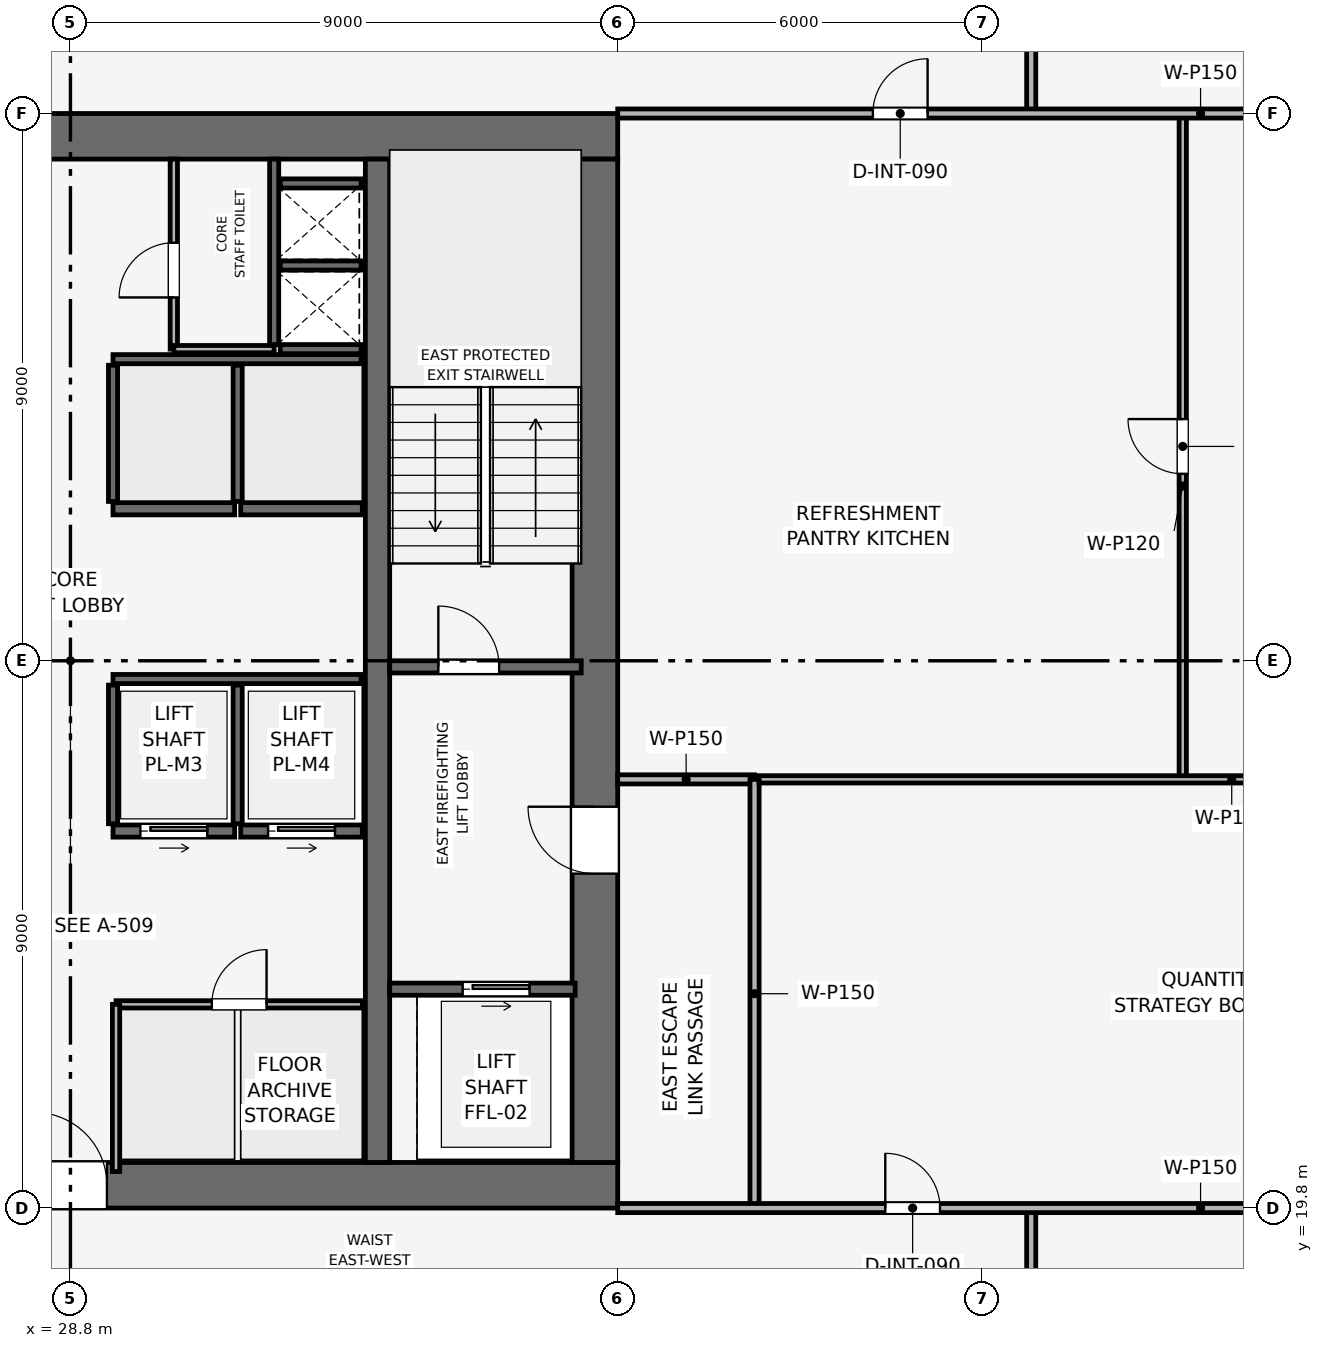
"""IFC4 building model, lengths in metres.
Left out: names, types, materials, properties, quantities, classifications, styles, units other than length and angle.
Written with IfcOpenShell. Run it as: python <this file> out.ifc"""

import sys

from ifc_helpers import new_model, si_unit, direction, frame, frame_2d, origin, place, context, subcontext, project, spatial, rectangle, extrude, element, fill, save


model = new_model("IFC4")
c1 = context("Model", 3, precision=1e-05, world=origin(), true_north=direction((0.0, 1.0)))
c2 = subcontext(c1, "Body", "Model", "MODEL_VIEW")
j1 = project(units=[si_unit("LENGTHUNIT", "METRE"), si_unit("PLANEANGLEUNIT", "RADIAN")], contexts=[c1])
p1 = place(None, origin())
s1 = spatial("IfcSite", under=j1, at=p1, CompositionType="ELEMENT")
p2 = place(p1, origin())
s2 = spatial("IfcBuilding", under=s1, at=p2, CompositionType="ELEMENT")
p3 = place(p2, frame((0.0, 0.0, 218.7)))
s3 = spatial("IfcBuildingStorey", under=s2, at=p3, CompositionType="ELEMENT", Elevation=218.7)
p4 = place(p3, frame((19.8, 20.175, 0.0), z_axis=(0.0, 0.0, 1.0), x_axis=(1.0, 0.0, 0.0)))
e1 = element("IfcWall", 1, at=p4, inside=s3, PredefinedType="SHEAR", context=c2, shape_type="SweptSolid", body=[
    extrude(rectangle(XDim=18.0, YDim=0.75, at=frame_2d((9.0, 0.0))), origin(), (0.0, 0.0, 1.0), 3.75),
])
p5 = place(p4, frame((8.4, 0.0, 0.0)))
e2 = element("IfcOpeningElement", 2, at=p5, cuts=e1, PredefinedType="OPENING", context=c2, shape_type="SweptSolid", body=[
    extrude(rectangle(XDim=1.2, YDim=2.2, at=frame_2d((0.6, 1.1))), frame((0.0, 0.385, 0.0), z_axis=(0.0, -1.0, 0.0), x_axis=(1.0, 0.0, 0.0)), (0.0, 0.0, 1.0), 0.77),
])
p6 = place(p3, frame((19.8, 37.425, 0.0), z_axis=(0.0, 0.0, 1.0), x_axis=(1.0, 0.0, 0.0)))
e3 = element("IfcWall", 3, at=p6, inside=s3, PredefinedType="SHEAR", context=c2, shape_type="SweptSolid", body=[
    extrude(rectangle(XDim=18.0, YDim=0.75, at=frame_2d((9.0, 0.0))), origin(), (0.0, 0.0, 1.0), 3.75),
])
p7 = place(p6, frame((7.05, 0.0, 0.0)))
e4 = element("IfcOpeningElement", 4, at=p7, cuts=e3, PredefinedType="OPENING", context=c2, shape_type="SweptSolid", body=[
    extrude(rectangle(XDim=1.1, YDim=2.15, at=frame_2d((0.55, 1.075))), frame((0.0, 0.385, 0.0), z_axis=(0.0, -1.0, 0.0), x_axis=(1.0, 0.0, 0.0)), (0.0, 0.0, 1.0), 0.77),
])
p8 = place(p3, frame((37.425, 20.55, 0.0), z_axis=(0.0, 0.0, 1.0), x_axis=(0.0, 1.0, 0.0)))
e5 = element("IfcWall", 5, at=p8, inside=s3, PredefinedType="SHEAR", context=c2, shape_type="SweptSolid", body=[
    extrude(rectangle(XDim=16.5, YDim=0.75, at=frame_2d((8.25, 0.0))), origin(), (0.0, 0.0, 1.0), 3.75),
])
p9 = place(p8, frame((4.75, 0.0, 0.0)))
e6 = element("IfcOpeningElement", 6, at=p9, cuts=e5, PredefinedType="OPENING", context=c2, shape_type="SweptSolid", body=[
    extrude(rectangle(XDim=1.1, YDim=2.15, at=frame_2d((0.55, 1.075))), frame((0.0, 0.385, 0.0), z_axis=(0.0, -1.0, 0.0), x_axis=(1.0, 0.0, 0.0)), (0.0, 0.0, 1.0), 0.77),
])
p10 = place(p3, frame((33.85, 20.55, 0.0), z_axis=(0.0, 0.0, 1.0), x_axis=(0.0, 1.0, 0.0)))
e7 = element("IfcWall", 7, at=p10, inside=s3, PredefinedType="SHEAR", context=c2, shape_type="SweptSolid", body=[
    extrude(rectangle(XDim=16.5, YDim=0.4, at=frame_2d((8.25, 0.0))), origin(), (0.0, 0.0, 1.0), 3.75),
])
p11 = place(p3, frame((34.05, 28.7, 0.0), z_axis=(0.0, 0.0, 1.0), x_axis=(1.0, 0.0, 0.0)))
e8 = element("IfcWall", 8, at=p11, inside=s3, PredefinedType="SHEAR", context=c2, shape_type="SweptSolid", body=[
    extrude(rectangle(XDim=3.15, YDim=0.2, at=frame_2d((1.575, 0.0))), origin(), (0.0, 0.0, 1.0), 3.5),
])
p12 = place(p11, frame((0.8, 0.0, 0.0)))
e9 = element("IfcOpeningElement", 9, at=p12, cuts=e8, PredefinedType="OPENING", context=c2, shape_type="SweptSolid", body=[
    extrude(rectangle(XDim=1.0, YDim=2.1, at=frame_2d((0.5, 1.05))), frame((0.0, 0.11, 0.0), z_axis=(0.0, -1.0, 0.0), x_axis=(1.0, 0.0, 0.0)), (0.0, 0.0, 1.0), 0.22),
])
p13 = place(p3, frame((32.15, 34.0, 0.0), z_axis=(0.0, 0.0, 1.0), x_axis=(0.0, 1.0, 0.0)))
e10 = element("IfcWall", 10, at=p13, inside=s3, PredefinedType="SHEAR", context=c2, shape_type="SweptSolid", body=[
    extrude(rectangle(XDim=3.05, YDim=0.15, at=frame_2d((1.525, 0.0))), origin(), (0.0, 0.0, 1.0), 3.5),
])
for number, where, z_axis, x_axis in (
    (11, (32.25, 33.925, 0.0), (0.0, 0.0, 1.0), (1.0, 0.0, 0.0)),
    (12, (32.25, 35.3, 0.0), (0.0, 0.0, 1.0), (1.0, 0.0, 0.0)),
):
    element("IfcWall", number, at=place(p3, frame(where, z_axis=z_axis, x_axis=x_axis)), inside=s3, PredefinedType="SHEAR", context=c2, shape_type="SweptSolid", body=[
        extrude(rectangle(XDim=1.33, YDim=0.15, at=frame_2d((0.665, 0.0))), origin(), (0.0, 0.0, 1.0), 3.5),
    ])
p14 = place(p3, frame((34.05, 23.4, 0.0), z_axis=(0.0, 0.0, 1.0), x_axis=(1.0, 0.0, 0.0)))
e13 = element("IfcWall", 13, at=p14, inside=s3, PredefinedType="SHEAR", context=c2, shape_type="SweptSolid", body=[
    extrude(rectangle(XDim=3.05, YDim=0.2, at=frame_2d((1.525, 0.0))), origin(), (0.0, 0.0, 1.0), 3.5),
])
p15 = place(p14, frame((1.2, 0.0, 0.0)))
e14 = element("IfcOpeningElement", 14, at=p15, cuts=e13, PredefinedType="OPENING", context=c2, shape_type="SweptSolid", body=[
    extrude(rectangle(XDim=1.1, YDim=2.15, at=frame_2d((0.55, 1.075))), frame((0.0, 0.11, 0.0), z_axis=(0.0, -1.0, 0.0), x_axis=(1.0, 0.0, 0.0)), (0.0, 0.0, 1.0), 0.22),
])
p16 = place(p3, frame((29.5, 26.0, 0.0), z_axis=(0.0, 0.0, 1.0), x_axis=(1.0, 0.0, 0.0)))
e15 = element("IfcWall", 15, at=p16, inside=s3, PredefinedType="SHEAR", context=c2, shape_type="SweptSolid", body=[
    extrude(rectangle(XDim=2.0, YDim=0.2, at=frame_2d((1.0, 0.0))), origin(), (0.0, 0.0, 1.0), 3.5),
])
p17 = place(p16, frame((0.45, 0.0, 0.0)))
e16 = element("IfcOpeningElement", 16, at=p17, cuts=e15, PredefinedType="OPENING", context=c2, shape_type="SweptSolid", body=[
    extrude(rectangle(XDim=1.1, YDim=2.15, at=frame_2d((0.55, 1.075))), frame((0.0, 0.11, 0.0), z_axis=(0.0, -1.0, 0.0), x_axis=(1.0, 0.0, 0.0)), (0.0, 0.0, 1.0), 0.22),
])
p18 = place(p3, frame((31.6, 26.0, 0.0), z_axis=(0.0, 0.0, 1.0), x_axis=(1.0, 0.0, 0.0)))
e17 = element("IfcWall", 17, at=p18, inside=s3, PredefinedType="SHEAR", context=c2, shape_type="SweptSolid", body=[
    extrude(rectangle(XDim=2.0, YDim=0.2, at=frame_2d((1.0, 0.0))), origin(), (0.0, 0.0, 1.0), 3.5),
])
p19 = place(p18, frame((0.45, 0.0, 0.0)))
e18 = element("IfcOpeningElement", 18, at=p19, cuts=e17, PredefinedType="OPENING", context=c2, shape_type="SweptSolid", body=[
    extrude(rectangle(XDim=1.1, YDim=2.15, at=frame_2d((0.55, 1.075))), frame((0.0, 0.11, 0.0), z_axis=(0.0, -1.0, 0.0), x_axis=(1.0, 0.0, 0.0)), (0.0, 0.0, 1.0), 0.22),
])
for number, where, z_axis, x_axis in (
    (19, (29.5, 31.3, 0.0), (0.0, 0.0, 1.0), (1.0, 0.0, 0.0)),
    (20, (31.6, 31.3, 0.0), (0.0, 0.0, 1.0), (1.0, 0.0, 0.0)),
):
    element("IfcWall", number, at=place(p3, frame(where, z_axis=z_axis, x_axis=x_axis)), inside=s3, PredefinedType="SHEAR", context=c2, shape_type="SweptSolid", body=[
        extrude(rectangle(XDim=2.0, YDim=0.2, at=frame_2d((1.0, 0.0))), origin(), (0.0, 0.0, 1.0), 3.5),
    ])
p20 = place(p3, frame((32.25, 36.65, 0.0), z_axis=(0.0, 0.0, 1.0), x_axis=(1.0, 0.0, 0.0)))
e21 = element("IfcWall", 21, at=p20, inside=s3, PredefinedType="SHEAR", context=c2, shape_type="SweptSolid", body=[
    extrude(rectangle(XDim=1.33, YDim=0.15, at=frame_2d((0.665, 0.0))), origin(), (0.0, 0.0, 1.0), 3.5),
])
p21 = place(p3, frame((29.5, 28.5, 0.0), z_axis=(0.0, 0.0, 1.0), x_axis=(1.0, 0.0, 0.0)))
e22 = element("IfcWall", 22, at=p21, inside=s3, PredefinedType="SHEAR", context=c2, shape_type="SweptSolid", body=[
    extrude(rectangle(XDim=4.08, YDim=0.15, at=frame_2d((2.04, 0.0))), origin(), (0.0, 0.0, 1.0), 3.5),
])
for number, where, z_axis, x_axis in (
    (23, (29.5, 26.12, 0.0), (0.0, 0.0, 1.0), (0.0, 1.0, 0.0)),
    (24, (31.55, 26.12, 0.0), (0.0, 0.0, 1.0), (0.0, 1.0, 0.0)),
):
    element("IfcWall", number, at=place(p3, frame(where, z_axis=z_axis, x_axis=x_axis)), inside=s3, PredefinedType="SHEAR", context=c2, shape_type="SweptSolid", body=[
        extrude(rectangle(XDim=2.28, YDim=0.15, at=frame_2d((1.14, 0.0))), origin(), (0.0, 0.0, 1.0), 3.5),
    ])
p22 = place(p3, frame((29.5, 33.76, 0.0), z_axis=(0.0, 0.0, 1.0), x_axis=(1.0, 0.0, 0.0)))
e25 = element("IfcWall", 25, at=p22, inside=s3, PredefinedType="SHEAR", context=c2, shape_type="SweptSolid", body=[
    extrude(rectangle(XDim=4.08, YDim=0.15, at=frame_2d((2.04, 0.0))), origin(), (0.0, 0.0, 1.0), 3.5),
])
for number, where, z_axis, x_axis in (
    (26, (29.5, 31.42, 0.0), (0.0, 0.0, 1.0), (0.0, 1.0, 0.0)),
    (27, (31.55, 31.42, 0.0), (0.0, 0.0, 1.0), (0.0, 1.0, 0.0)),
):
    element("IfcWall", number, at=place(p3, frame(where, z_axis=z_axis, x_axis=x_axis)), inside=s3, PredefinedType="SHEAR", context=c2, shape_type="SweptSolid", body=[
        extrude(rectangle(XDim=2.24, YDim=0.15, at=frame_2d((1.12, 0.0))), origin(), (0.0, 0.0, 1.0), 3.5),
    ])
p23 = place(p3, frame((30.5, 33.925, 0.0), z_axis=(0.0, 0.0, 1.0), x_axis=(0.0, 1.0, 0.0)))
e28 = element("IfcWall", 28, at=p23, inside=s3, PredefinedType="PARTITIONING", context=c2, shape_type="SweptSolid", body=[
    extrude(rectangle(XDim=3.125, YDim=0.12, at=frame_2d((1.562, 0.0))), origin(), (0.0, 0.0, 1.0), 3.5),
])
p24 = place(p23, frame((0.85, 0.0, 0.0)))
e29 = element("IfcOpeningElement", 29, at=p24, cuts=e28, PredefinedType="OPENING", context=c2, shape_type="SweptSolid", body=[
    extrude(rectangle(XDim=0.9, YDim=2.1, at=frame_2d((0.45, 1.05))), frame((0.0, 0.07, 0.0), z_axis=(0.0, -1.0, 0.0), x_axis=(1.0, 0.0, 0.0)), (0.0, 0.0, 1.0), 0.14),
])
p25 = place(p3, frame((30.5, 33.925, 0.0), z_axis=(0.0, 0.0, 1.0), x_axis=(1.0, 0.0, 0.0)))
e30 = element("IfcWall", 30, at=p25, inside=s3, PredefinedType="PARTITIONING", context=c2, shape_type="SweptSolid", body=[
    extrude(rectangle(XDim=1.65, YDim=0.12, at=frame_2d((0.825, 0.0))), origin(), (0.0, 0.0, 1.0), 3.5),
])
p26 = place(p3, frame((29.55, 23.15, 0.0), z_axis=(0.0, 0.0, 1.0), x_axis=(1.0, 0.0, 0.0)))
e31 = element("IfcWall", 31, at=p26, inside=s3, PredefinedType="PARTITIONING", context=c2, shape_type="SweptSolid", body=[
    extrude(rectangle(XDim=4.05, YDim=0.12, at=frame_2d((2.025, 0.0))), origin(), (0.0, 0.0, 1.0), 3.5),
])
p27 = place(p26, frame((1.575, 0.0, 0.0)))
e32 = element("IfcOpeningElement", 32, at=p27, cuts=e31, PredefinedType="OPENING", context=c2, shape_type="SweptSolid", body=[
    extrude(rectangle(XDim=0.9, YDim=2.1, at=frame_2d((0.45, 1.05))), frame((0.0, 0.07, 0.0), z_axis=(0.0, -1.0, 0.0), x_axis=(1.0, 0.0, 0.0)), (0.0, 0.0, 1.0), 0.14),
])
p28 = place(p3, frame((29.55, 20.4, 0.0), z_axis=(0.0, 0.0, 1.0), x_axis=(0.0, 1.0, 0.0)))
e33 = element("IfcWall", 33, at=p28, inside=s3, PredefinedType="PARTITIONING", context=c2, shape_type="SweptSolid", body=[
    extrude(rectangle(XDim=2.75, YDim=0.12, at=frame_2d((1.375, 0.0))), origin(), (0.0, 0.0, 1.0), 3.5),
])
p29 = place(p3, frame((37.8, 26.85, 0.0), z_axis=(0.0, 0.0, 1.0), x_axis=(1.0, 0.0, 0.0)))
e34 = element("IfcWall", 34, at=p29, inside=s3, PredefinedType="PARTITIONING", context=c2, shape_type="SweptSolid", body=[
    extrude(rectangle(XDim=2.25, YDim=0.15, at=frame_2d((1.125, 0.0))), origin(), (0.0, 0.0, 1.0), 3.5),
])
p30 = place(p3, frame((40.05, 19.8, 0.0), z_axis=(0.0, 0.0, 1.0), x_axis=(0.0, 1.0, 0.0)))
e35 = element("IfcWall", 35, at=p30, inside=s3, PredefinedType="PARTITIONING", context=c2, shape_type="SweptSolid", body=[
    extrude(rectangle(XDim=7.05, YDim=0.15, at=frame_2d((3.525, 0.0))), origin(), (0.0, 0.0, 1.0), 3.035),
])
p31 = place(p3, frame((47.092, 26.85, 0.0), z_axis=(0.0, 0.0, 1.0), x_axis=(0.0, 1.0, 0.0)))
e36 = element("IfcWall", 36, at=p31, inside=s3, PredefinedType="PARTITIONING", context=c2, shape_type="SweptSolid", body=[
    extrude(rectangle(XDim=10.95, YDim=0.12, at=frame_2d((5.475, 0.0))), origin(), (0.0, 0.0, 1.0), 3.035),
])
p32 = place(p31, frame((5.025, 0.0, 0.0)))
e37 = element("IfcOpeningElement", 37, at=p32, cuts=e36, PredefinedType="OPENING", context=c2, shape_type="SweptSolid", body=[
    extrude(rectangle(XDim=0.9, YDim=2.1, at=frame_2d((0.45, 1.05))), frame((0.0, 0.07, 0.0), z_axis=(0.0, -1.0, 0.0), x_axis=(1.0, 0.0, 0.0)), (0.0, 0.0, 1.0), 0.14),
])
p33 = place(p3, frame((40.125, 26.85, 0.0), z_axis=(0.0, 0.0, 1.0), x_axis=(1.0, 0.0, 0.0)))
e38 = element("IfcWall", 38, at=p33, inside=s3, PredefinedType="PARTITIONING", context=c2, shape_type="SweptSolid", body=[
    extrude(rectangle(XDim=15.545, YDim=0.12, at=frame_2d((7.772, 0.0))), origin(), (0.0, 0.0, 1.0), 2.885),
])
p34 = place(p3, frame((44.6, 17.4, 0.0), z_axis=(0.0, 0.0, 1.0), x_axis=(0.0, 1.0, 0.0)))
e39 = element("IfcWall", 39, at=p34, inside=s3, PredefinedType="PARTITIONING", context=c2, shape_type="SweptSolid", body=[
    extrude(rectangle(XDim=2.4, YDim=0.15, at=frame_2d((1.2, 0.0))), origin(), (0.0, 0.0, 1.0), 3.5),
])
p35 = place(p3, frame((44.6, 37.8, 0.0), z_axis=(0.0, 0.0, 1.0), x_axis=(0.0, 1.0, 0.0)))
e40 = element("IfcWall", 40, at=p35, inside=s3, PredefinedType="PARTITIONING", context=c2, shape_type="SweptSolid", body=[
    extrude(rectangle(XDim=2.4, YDim=0.15, at=frame_2d((1.2, 0.0))), origin(), (0.0, 0.0, 1.0), 3.5),
])
p36 = place(p3, frame((37.8, 19.8, 0.0), z_axis=(0.0, 0.0, 1.0), x_axis=(1.0, 0.0, 0.0)))
e41 = element("IfcWall", 41, at=p36, inside=s3, PredefinedType="PARTITIONING", context=c2, shape_type="SweptSolid", body=[
    extrude(rectangle(XDim=17.87, YDim=0.15, at=frame_2d((8.935, 0.0))), origin(), (0.0, 0.0, 1.0), 2.885),
])
p37 = place(p36, frame((4.4, 0.0, 0.0)))
e42 = element("IfcOpeningElement", 42, at=p37, cuts=e41, PredefinedType="OPENING", context=c2, shape_type="SweptSolid", body=[
    extrude(rectangle(XDim=0.9, YDim=2.1, at=frame_2d((0.45, 1.05))), frame((0.0, 0.085, 0.0), z_axis=(0.0, -1.0, 0.0), x_axis=(1.0, 0.0, 0.0)), (0.0, 0.0, 1.0), 0.17),
])
p38 = place(p3, frame((37.8, 37.8, 0.0), z_axis=(0.0, 0.0, 1.0), x_axis=(1.0, 0.0, 0.0)))
e43 = element("IfcWall", 43, at=p38, inside=s3, PredefinedType="PARTITIONING", context=c2, shape_type="SweptSolid", body=[
    extrude(rectangle(XDim=17.87, YDim=0.15, at=frame_2d((8.935, 0.0))), origin(), (0.0, 0.0, 1.0), 2.885),
])
p39 = place(p38, frame((4.196, 0.0, 0.0)))
e44 = element("IfcOpeningElement", 44, at=p39, cuts=e43, PredefinedType="OPENING", context=c2, shape_type="SweptSolid", body=[
    extrude(rectangle(XDim=0.9, YDim=2.1, at=frame_2d((0.45, 1.05))), frame((0.0, 0.085, 0.0), z_axis=(0.0, -1.0, 0.0), x_axis=(1.0, 0.0, 0.0)), (0.0, 0.0, 1.0), 0.17),
])
p40 = place(p12, origin())
e45 = element("IfcDoor", 45, at=p40, inside=s3, OperationType="SINGLE_SWING_LEFT", PredefinedType="DOOR", context=c2, shape_type="SweptSolid", body=[
    extrude(rectangle(XDim=1.0, YDim=2.1, at=frame_2d((0.5, 1.05))), frame((0.0, 0.025, 0.0), z_axis=(0.0, -1.0, 0.0), x_axis=(1.0, 0.0, 0.0)), (0.0, 0.0, 1.0), 0.05),
])
fill(e9, e45)
p41 = place(p15, origin())
e46 = element("IfcDoor", 46, at=p41, inside=s3, OperationType="SLIDING_TO_RIGHT", PredefinedType="DOOR", context=c2, shape_type="SweptSolid", body=[
    extrude(rectangle(XDim=1.1, YDim=2.15, at=frame_2d((0.55, 1.075))), frame((0.0, 0.025, 0.0), z_axis=(0.0, -1.0, 0.0), x_axis=(1.0, 0.0, 0.0)), (0.0, 0.0, 1.0), 0.05),
])
fill(e14, e46)
p42 = place(p17, origin())
e47 = element("IfcDoor", 47, at=p42, inside=s3, OperationType="SLIDING_TO_RIGHT", PredefinedType="DOOR", context=c2, shape_type="SweptSolid", body=[
    extrude(rectangle(XDim=1.1, YDim=2.15, at=frame_2d((0.55, 1.075))), frame((0.0, 0.025, 0.0), z_axis=(0.0, -1.0, 0.0), x_axis=(1.0, 0.0, 0.0)), (0.0, 0.0, 1.0), 0.05),
])
fill(e16, e47)
p43 = place(p19, origin())
e48 = element("IfcDoor", 48, at=p43, inside=s3, OperationType="SLIDING_TO_RIGHT", PredefinedType="DOOR", context=c2, shape_type="SweptSolid", body=[
    extrude(rectangle(XDim=1.1, YDim=2.15, at=frame_2d((0.55, 1.075))), frame((0.0, 0.025, 0.0), z_axis=(0.0, -1.0, 0.0), x_axis=(1.0, 0.0, 0.0)), (0.0, 0.0, 1.0), 0.05),
])
fill(e18, e48)
p44 = place(p24, origin())
e49 = element("IfcDoor", 49, at=p44, inside=s3, OperationType="SINGLE_SWING_LEFT", PredefinedType="DOOR", context=c2, shape_type="SweptSolid", body=[
    extrude(rectangle(XDim=0.9, YDim=2.1, at=frame_2d((0.45, 1.05))), frame((0.0, 0.025, 0.0), z_axis=(0.0, -1.0, 0.0), x_axis=(1.0, 0.0, 0.0)), (0.0, 0.0, 1.0), 0.05),
])
fill(e29, e49)
p45 = place(p27, origin())
e50 = element("IfcDoor", 50, at=p45, inside=s3, OperationType="SINGLE_SWING_RIGHT", PredefinedType="DOOR", context=c2, shape_type="SweptSolid", body=[
    extrude(rectangle(XDim=0.9, YDim=2.1, at=frame_2d((0.45, 1.05))), frame((0.0, 0.025, 0.0), z_axis=(0.0, -1.0, 0.0), x_axis=(1.0, 0.0, 0.0)), (0.0, 0.0, 1.0), 0.05),
])
fill(e32, e50)
p46 = place(p32, origin())
e51 = element("IfcDoor", 51, at=p46, inside=s3, OperationType="SINGLE_SWING_RIGHT", PredefinedType="DOOR", context=c2, shape_type="SweptSolid", body=[
    extrude(rectangle(XDim=0.9, YDim=2.1, at=frame_2d((0.45, 1.05))), frame((0.0, 0.025, 0.0), z_axis=(0.0, -1.0, 0.0), x_axis=(1.0, 0.0, 0.0)), (0.0, 0.0, 1.0), 0.05),
])
fill(e37, e51)
p47 = place(p37, origin())
e52 = element("IfcDoor", 52, at=p47, inside=s3, OperationType="SINGLE_SWING_LEFT", PredefinedType="DOOR", context=c2, shape_type="SweptSolid", body=[
    extrude(rectangle(XDim=0.9, YDim=2.1, at=frame_2d((0.45, 1.05))), frame((0.0, 0.025, 0.0), z_axis=(0.0, -1.0, 0.0), x_axis=(1.0, 0.0, 0.0)), (0.0, 0.0, 1.0), 0.05),
])
fill(e42, e52)
p48 = place(p39, origin())
e53 = element("IfcDoor", 53, at=p48, inside=s3, OperationType="SINGLE_SWING_RIGHT", PredefinedType="DOOR", context=c2, shape_type="SweptSolid", body=[
    extrude(rectangle(XDim=0.9, YDim=2.1, at=frame_2d((0.45, 1.05))), frame((0.0, 0.025, 0.0), z_axis=(0.0, -1.0, 0.0), x_axis=(1.0, 0.0, 0.0)), (0.0, 0.0, 1.0), 0.05),
])
fill(e44, e53)
p49 = place(p9, origin())
e54 = element("IfcDoor", 54, at=p49, inside=s3, OperationType="SINGLE_SWING_RIGHT", PredefinedType="DOOR", context=c2, shape_type="SweptSolid", body=[
    extrude(rectangle(XDim=1.1, YDim=2.15, at=frame_2d((0.55, 1.075))), frame((0.0, 0.025, 0.0), z_axis=(0.0, -1.0, 0.0), x_axis=(1.0, 0.0, 0.0)), (0.0, 0.0, 1.0), 0.05),
])
fill(e6, e54)
p50 = place(p5, origin())
e55 = element("IfcDoor", 55, at=p50, inside=s3, OperationType="SINGLE_SWING_LEFT", PredefinedType="DOOR", context=c2, shape_type="SweptSolid", body=[
    extrude(rectangle(XDim=1.2, YDim=2.2, at=frame_2d((0.6, 1.1))), frame((0.0, 0.025, 0.0), z_axis=(0.0, -1.0, 0.0), x_axis=(1.0, 0.0, 0.0)), (0.0, 0.0, 1.0), 0.05),
])
fill(e2, e55)
save(model, sys.argv[1])
